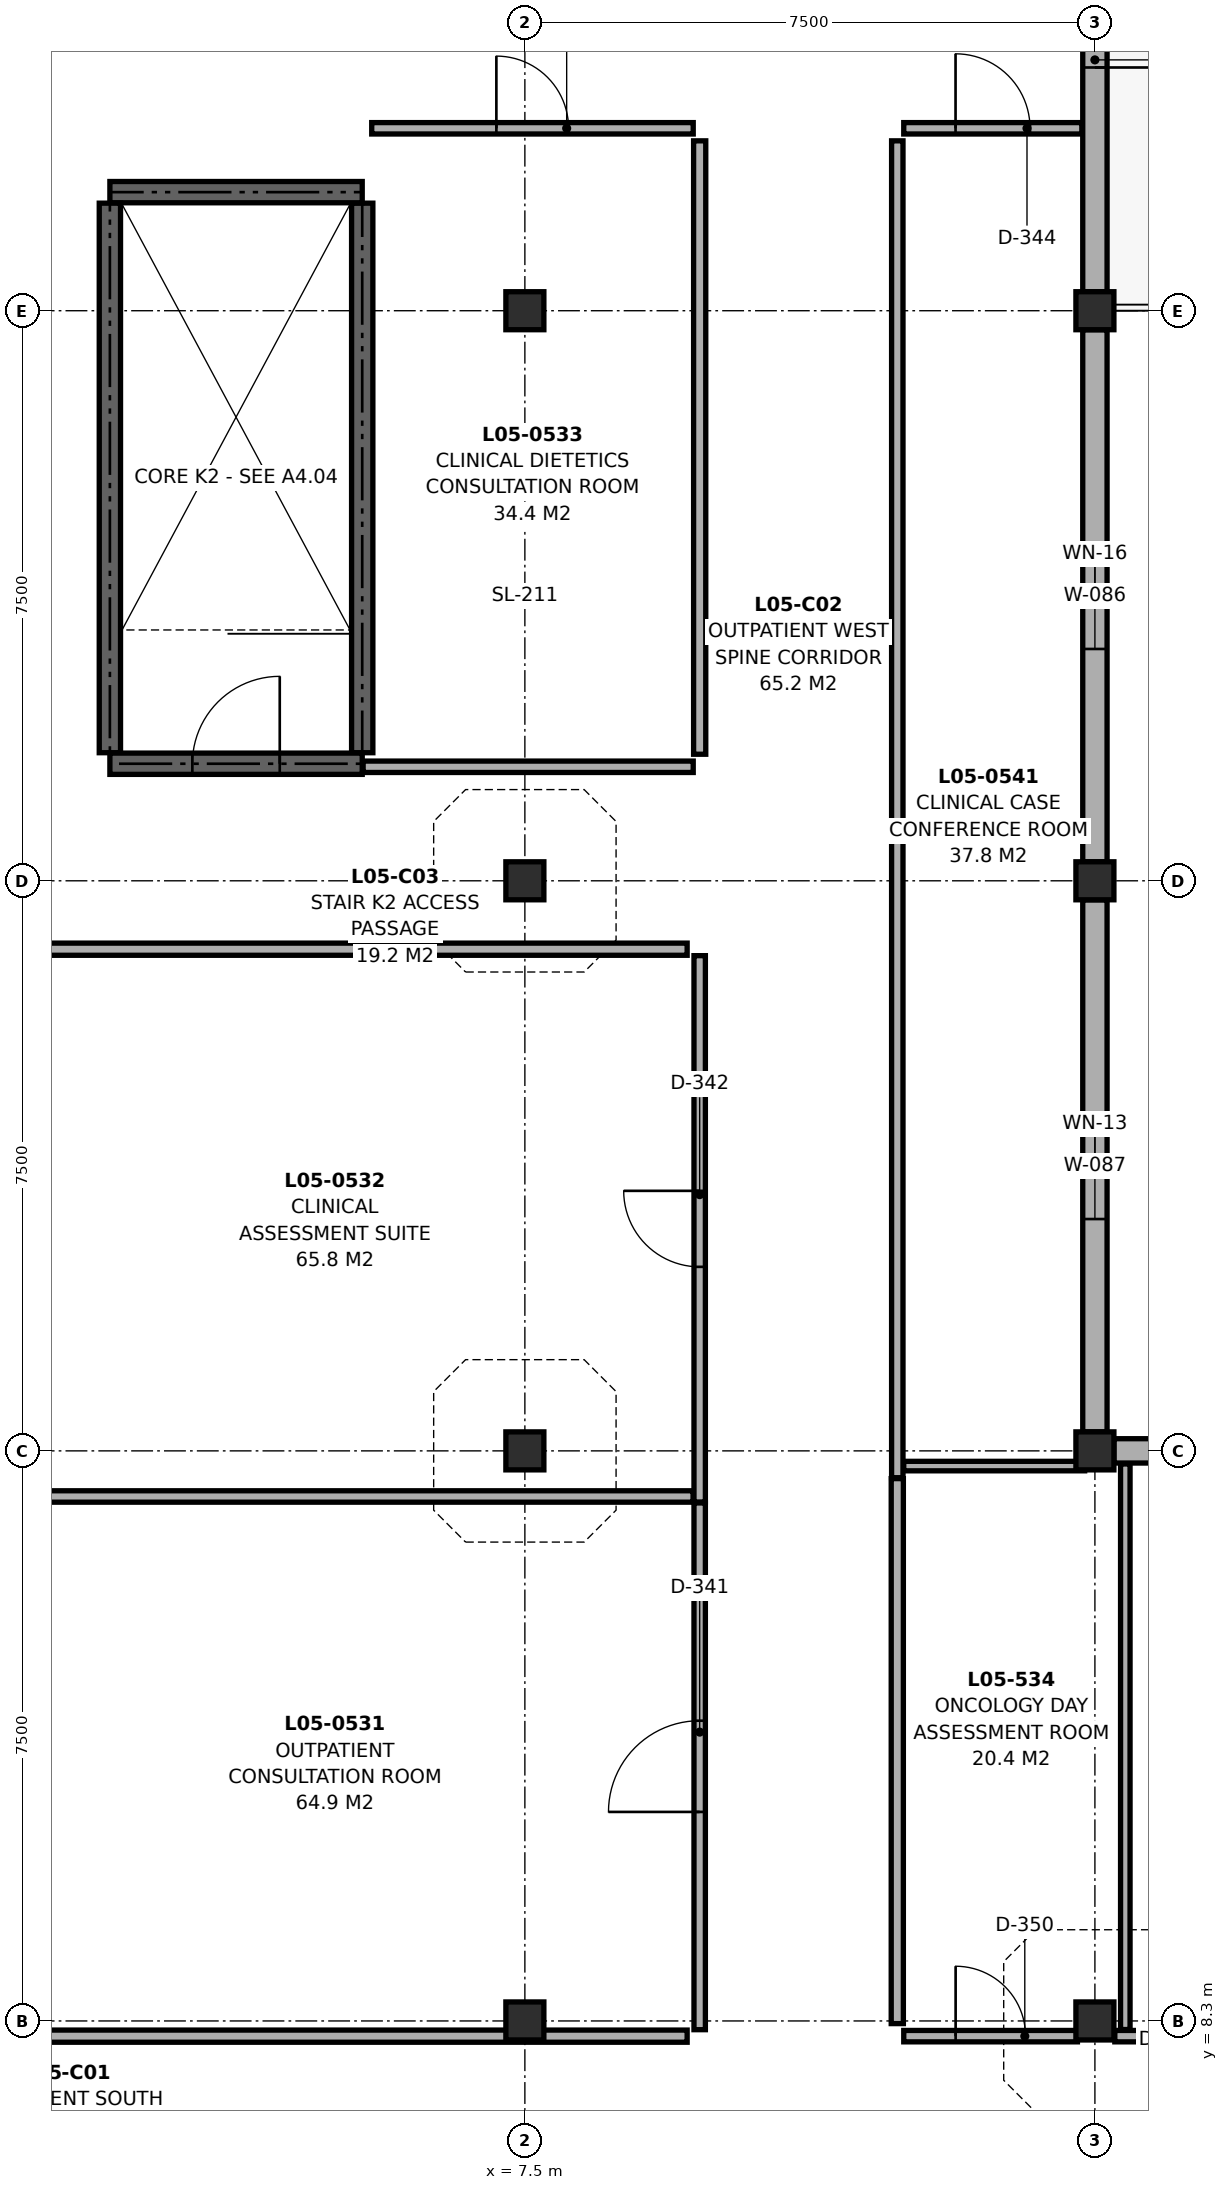
"""IFC4 building model, lengths in metres.
Left out: names, types, materials, properties, quantities, classifications, styles, units other than length and angle.
Written with IfcOpenShell. Run it as: python <this file> out.ifc"""

import sys

from ifc_helpers import new_model, si_unit, direction, frame, frame_2d, origin, origin_2d, place, context, subcontext, project, spatial, rectangle, extrude, element, fill, save


model = new_model("IFC4")
c1 = context("Model", 3, precision=1e-05, world=origin(), true_north=direction((0.0, 1.0)))
c2 = subcontext(c1, "Body", "Model", "MODEL_VIEW")
j1 = project(units=[si_unit("LENGTHUNIT", "METRE"), si_unit("PLANEANGLEUNIT", "RADIAN")], contexts=[c1])
p1 = place(None, origin())
s1 = spatial("IfcSite", under=j1, at=p1, CompositionType="ELEMENT")
p2 = place(p1, origin())
s2 = spatial("IfcBuilding", under=s1, at=p2, CompositionType="ELEMENT")
p3 = place(p2, frame((0.0, 0.0, 21.5)))
s3 = spatial("IfcBuildingStorey", under=s2, at=p3, CompositionType="ELEMENT", Elevation=21.5)
p4 = place(p3, frame((7.5, 8.3, 0.0), z_axis=(0.0, 0.0, 1.0), x_axis=(1.0, 0.0, 0.0)))
e1 = element("IfcColumn", 1, at=p4, inside=s3, PredefinedType="COLUMN", context=c2, shape_type="SweptSolid", body=[
    extrude(rectangle(XDim=0.5, YDim=0.5, at=origin_2d()), origin(), (0.0, 0.0, 1.0), 4.08),
])
for number, where, z_axis, x_axis in (
    (2, (7.5, 15.8, 0.0), (0.0, 0.0, 1.0), (1.0, 0.0, 0.0)),
    (3, (7.5, 23.3, 0.0), (0.0, 0.0, 1.0), (1.0, 0.0, 0.0)),
    (4, (7.5, 30.8, 0.0), (0.0, 0.0, 1.0), (1.0, 0.0, 0.0)),
):
    element("IfcColumn", number, at=place(p3, frame(where, z_axis=z_axis, x_axis=x_axis)), inside=s3, PredefinedType="COLUMN", context=c2, shape_type="SweptSolid", body=[
        extrude(rectangle(XDim=0.5, YDim=0.5, at=origin_2d()), origin(), (0.0, 0.0, 1.0), 3.8),
    ])
p5 = place(p3, frame((15.0, 8.3, 0.0), z_axis=(0.0, 0.0, 1.0), x_axis=(1.0, 0.0, 0.0)))
e5 = element("IfcColumn", 5, at=p5, inside=s3, PredefinedType="COLUMN", context=c2, shape_type="SweptSolid", body=[
    extrude(rectangle(XDim=0.5, YDim=0.5, at=origin_2d()), origin(), (0.0, 0.0, 1.0), 4.33),
])
for number, where, z_axis, x_axis in (
    (6, (15.0, 15.8, 0.0), (0.0, 0.0, 1.0), (1.0, 0.0, 0.0)),
    (7, (15.0, 23.3, 0.0), (0.0, 0.0, 1.0), (1.0, 0.0, 0.0)),
    (8, (15.0, 30.8, 0.0), (0.0, 0.0, 1.0), (1.0, 0.0, 0.0)),
):
    element("IfcColumn", number, at=place(p3, frame(where, z_axis=z_axis, x_axis=x_axis)), inside=s3, PredefinedType="COLUMN", context=c2, shape_type="SweptSolid", body=[
        extrude(rectangle(XDim=0.5, YDim=0.5, at=origin_2d()), origin(), (0.0, 0.0, 1.0), 3.8),
    ])
p6 = place(p3, frame((15.0, 38.05, 0.0), z_axis=(0.0, 0.0, 1.0), x_axis=(0.0, -1.0, 0.0)))
e9 = element("IfcWall", 9, at=p6, inside=s3, PredefinedType="SOLIDWALL", context=c2, shape_type="SweptSolid", body=[
    extrude(rectangle(XDim=7.0, YDim=0.32, at=frame_2d((3.5, 0.0))), origin(), (0.0, 0.0, 1.0), 3.7),
])
p7 = place(p6, frame((2.95, 0.0, 0.0)))
e10 = element("IfcOpeningElement", 10, at=p7, cuts=e9, PredefinedType="OPENING", context=c2, shape_type="SweptSolid", body=[
    extrude(rectangle(XDim=1.1, YDim=2.15, at=frame_2d((0.55, 1.075))), frame((0.0, 0.172, 0.0), z_axis=(0.0, -1.0, 0.0), x_axis=(1.0, 0.0, 0.0)), (0.0, 0.0, 1.0), 0.344),
])
p8 = place(p3, frame((15.0, 30.55, 0.0), z_axis=(0.0, 0.0, 1.0), x_axis=(0.0, -1.0, 0.0)))
e11 = element("IfcWall", 11, at=p8, inside=s3, PredefinedType="SOLIDWALL", context=c2, shape_type="SweptSolid", body=[
    extrude(rectangle(XDim=7.0, YDim=0.32, at=frame_2d((3.5, 0.0))), origin(), (0.0, 0.0, 1.0), 3.7),
])
p9 = place(p8, frame((2.8, 0.0, 0.9)))
e12 = element("IfcOpeningElement", 12, at=p9, cuts=e11, PredefinedType="OPENING", context=c2, shape_type="SweptSolid", body=[
    extrude(rectangle(XDim=1.4, YDim=1.9, at=frame_2d((0.7, 0.95))), frame((0.0, 0.172, 0.0), z_axis=(0.0, -1.0, 0.0), x_axis=(1.0, 0.0, 0.0)), (0.0, 0.0, 1.0), 0.344),
])
p10 = place(p3, frame((15.0, 23.05, 0.0), z_axis=(0.0, 0.0, 1.0), x_axis=(0.0, -1.0, 0.0)))
e13 = element("IfcWall", 13, at=p10, inside=s3, PredefinedType="SOLIDWALL", context=c2, shape_type="SweptSolid", body=[
    extrude(rectangle(XDim=7.0, YDim=0.32, at=frame_2d((3.5, 0.0))), origin(), (0.0, 0.0, 1.0), 3.7),
])
p11 = place(p10, frame((2.8, 0.0, 0.9)))
e14 = element("IfcOpeningElement", 14, at=p11, cuts=e13, PredefinedType="OPENING", context=c2, shape_type="SweptSolid", body=[
    extrude(rectangle(XDim=1.4, YDim=1.3, at=frame_2d((0.7, 0.65))), frame((0.0, 0.172, 0.0), z_axis=(0.0, -1.0, 0.0), x_axis=(1.0, 0.0, 0.0)), (0.0, 0.0, 1.0), 0.344),
])
p12 = place(p3, frame((15.25, 15.8, 0.0), z_axis=(0.0, 0.0, 1.0), x_axis=(1.0, 0.0, 0.0)))
e15 = element("IfcWall", 15, at=p12, inside=s3, PredefinedType="SOLIDWALL", context=c2, shape_type="SweptSolid", body=[
    extrude(rectangle(XDim=7.0, YDim=0.32, at=frame_2d((3.5, 0.0))), origin(), (0.0, 0.0, 1.0), 3.7),
])
p13 = place(p3, frame((5.36, 24.985, 0.0), z_axis=(0.0, 0.0, 1.0), x_axis=(0.0, 1.0, 0.0)))
e16 = element("IfcWall", 16, at=p13, inside=s3, PredefinedType="SHEAR", context=c2, shape_type="SweptSolid", body=[
    extrude(rectangle(XDim=7.23, YDim=0.28, at=frame_2d((3.615, 0.0))), origin(), (0.0, 0.0, 1.0), 3.72),
])
p14 = place(p3, frame((5.36, 32.36, 0.0), z_axis=(0.0, 0.0, 1.0), x_axis=(-1.0, 0.0, 0.0)))
e17 = element("IfcWall", 17, at=p14, inside=s3, PredefinedType="SHEAR", context=c2, shape_type="SweptSolid", body=[
    extrude(rectangle(XDim=3.32, YDim=0.28, at=frame_2d((1.66, 0.0))), origin(), (0.0, 0.0, 1.0), 3.72),
])
p15 = place(p3, frame((2.04, 32.215, 0.0), z_axis=(0.0, 0.0, 1.0), x_axis=(0.0, -1.0, 0.0)))
e18 = element("IfcWall", 18, at=p15, inside=s3, PredefinedType="SHEAR", context=c2, shape_type="SweptSolid", body=[
    extrude(rectangle(XDim=7.23, YDim=0.28, at=frame_2d((3.615, 0.0))), origin(), (0.0, 0.0, 1.0), 3.72),
])
p16 = place(p3, frame((2.04, 24.84, 0.0), z_axis=(0.0, 0.0, 1.0), x_axis=(1.0, 0.0, 0.0)))
e19 = element("IfcWall", 19, at=p16, inside=s3, PredefinedType="SHEAR", context=c2, shape_type="SweptSolid", body=[
    extrude(rectangle(XDim=3.32, YDim=0.28, at=frame_2d((1.66, 0.0))), origin(), (0.0, 0.0, 1.0), 3.72),
])
p17 = place(p16, frame((1.085, 0.0, 0.0)))
e20 = element("IfcOpeningElement", 20, at=p17, cuts=e19, PredefinedType="OPENING", context=c2, shape_type="SweptSolid", body=[
    extrude(rectangle(XDim=1.15, YDim=2.15, at=frame_2d((0.575, 1.075))), frame((0.0, 0.152, 0.0), z_axis=(0.0, -1.0, 0.0), x_axis=(1.0, 0.0, 0.0)), (0.0, 0.0, 1.0), 0.304),
])
p18 = place(p3, frame((15.262, 8.1, 0.0), z_axis=(0.0, 0.0, 1.0), x_axis=(1.0, 0.0, 0.0)))
e21 = element("IfcWall", 21, at=p18, inside=s3, PredefinedType="PARTITIONING", context=c2, shape_type="SweptSolid", body=[
    extrude(rectangle(XDim=7.146, YDim=0.15, at=frame_2d((3.573, 0.0))), origin(), (0.0, 0.0, 1.0), 3.7),
])
p19 = place(p18, frame((2.883, 0.0, 0.0)))
e22 = element("IfcOpeningElement", 22, at=p19, cuts=e21, PredefinedType="OPENING", context=c2, shape_type="SweptSolid", body=[
    extrude(rectangle(XDim=1.38, YDim=2.3, at=frame_2d((0.69, 1.15))), frame((0.0, 0.087, 0.0), z_axis=(0.0, -1.0, 0.0), x_axis=(1.0, 0.0, 0.0)), (0.0, 0.0, 1.0), 0.174),
])
p20 = place(p3, frame((9.8, 8.185, 0.0), z_axis=(0.0, 0.0, 1.0), x_axis=(0.0, 1.0, 0.0)))
e23 = element("IfcWall", 23, at=p20, inside=s3, PredefinedType="PARTITIONING", context=c2, shape_type="SweptSolid", body=[
    extrude(rectangle(XDim=6.93, YDim=0.15, at=frame_2d((3.465, 0.0))), origin(), (0.0, 0.0, 1.0), 3.7),
])
p21 = place(p20, frame((2.865, 0.0, 0.0)))
e24 = element("IfcOpeningElement", 24, at=p21, cuts=e23, PredefinedType="OPENING", context=c2, shape_type="SweptSolid", body=[
    extrude(rectangle(XDim=1.2, YDim=2.15, at=frame_2d((0.6, 1.075))), frame((0.0, 0.087, 0.0), z_axis=(0.0, -1.0, 0.0), x_axis=(1.0, 0.0, 0.0)), (0.0, 0.0, 1.0), 0.174),
])
p22 = place(p3, frame((9.8, 15.127, 0.0), z_axis=(0.0, 0.0, 1.0), x_axis=(0.0, 1.0, 0.0)))
e25 = element("IfcWall", 25, at=p22, inside=s3, PredefinedType="PARTITIONING", context=c2, shape_type="SweptSolid", body=[
    extrude(rectangle(XDim=7.188, YDim=0.15, at=frame_2d((3.594, 0.0))), origin(), (0.0, 0.0, 1.0), 3.7),
])
p23 = place(p22, frame((3.094, 0.0, 0.0)))
e26 = element("IfcOpeningElement", 26, at=p23, cuts=e25, PredefinedType="OPENING", context=c2, shape_type="SweptSolid", body=[
    extrude(rectangle(XDim=1.0, YDim=2.22, at=frame_2d((0.5, 1.11))), frame((0.0, 0.087, 0.0), z_axis=(0.0, -1.0, 0.0), x_axis=(1.0, 0.0, 0.0)), (0.0, 0.0, 1.0), 0.174),
])
p24 = place(p3, frame((5.485, 33.2, 0.0), z_axis=(0.0, 0.0, 1.0), x_axis=(1.0, 0.0, 0.0)))
e27 = element("IfcWall", 27, at=p24, inside=s3, PredefinedType="PARTITIONING", context=c2, shape_type="SweptSolid", body=[
    extrude(rectangle(XDim=4.23, YDim=0.15, at=frame_2d((2.115, 0.0))), origin(), (0.0, 0.0, 1.0), 3.7),
])
p25 = place(p24, frame((1.64, 0.0, 0.0)))
e28 = element("IfcOpeningElement", 28, at=p25, cuts=e27, PredefinedType="OPENING", context=c2, shape_type="SweptSolid", body=[
    extrude(rectangle(XDim=0.95, YDim=2.15, at=frame_2d((0.475, 1.075))), frame((0.0, 0.087, 0.0), z_axis=(0.0, -1.0, 0.0), x_axis=(1.0, 0.0, 0.0)), (0.0, 0.0, 1.0), 0.174),
])
p26 = place(p3, frame((12.485, 8.1, 0.0), z_axis=(0.0, 0.0, 1.0), x_axis=(1.0, 0.0, 0.0)))
e29 = element("IfcWall", 29, at=p26, inside=s3, PredefinedType="PARTITIONING", context=c2, shape_type="SweptSolid", body=[
    extrude(rectangle(XDim=2.285, YDim=0.15, at=frame_2d((1.143, 0.0))), origin(), (0.0, 0.0, 1.0), 3.7),
])
p27 = place(p26, frame((0.683, 0.0, 0.0)))
e30 = element("IfcOpeningElement", 30, at=p27, cuts=e29, PredefinedType="OPENING", context=c2, shape_type="SweptSolid", body=[
    extrude(rectangle(XDim=0.92, YDim=2.1, at=frame_2d((0.46, 1.05))), frame((0.0, 0.087, 0.0), z_axis=(0.0, -1.0, 0.0), x_axis=(1.0, 0.0, 0.0)), (0.0, 0.0, 1.0), 0.174),
])
p28 = place(p3, frame((12.485, 33.2, 0.0), z_axis=(0.0, 0.0, 1.0), x_axis=(1.0, 0.0, 0.0)))
e31 = element("IfcWall", 31, at=p28, inside=s3, PredefinedType="PARTITIONING", context=c2, shape_type="SweptSolid", body=[
    extrude(rectangle(XDim=2.343, YDim=0.15, at=frame_2d((1.171, 0.0))), origin(), (0.0, 0.0, 1.0), 3.7),
])
p29 = place(p28, frame((0.681, 0.0, 0.0)))
e32 = element("IfcOpeningElement", 32, at=p29, cuts=e31, PredefinedType="OPENING", context=c2, shape_type="SweptSolid", body=[
    extrude(rectangle(XDim=0.98, YDim=2.12, at=frame_2d((0.49, 1.06))), frame((0.0, 0.087, 0.0), z_axis=(0.0, -1.0, 0.0), x_axis=(1.0, 0.0, 0.0)), (0.0, 0.0, 1.0), 0.174),
])
p30 = place(p3, frame((5.372, 24.8, 0.0), z_axis=(0.0, 0.0, 1.0), x_axis=(1.0, 0.0, 0.0)))
e33 = element("IfcWall", 33, at=p30, inside=s3, PredefinedType="PARTITIONING", context=c2, shape_type="SweptSolid", body=[
    extrude(rectangle(XDim=4.343, YDim=0.15, at=frame_2d((2.171, 0.0))), origin(), (0.0, 0.0, 1.0), 3.7),
])
p31 = place(p3, frame((12.485, 15.6, 0.0), z_axis=(0.0, 0.0, 1.0), x_axis=(1.0, 0.0, 0.0)))
e34 = element("IfcWall", 34, at=p31, inside=s3, PredefinedType="PARTITIONING", context=c2, shape_type="SweptSolid", body=[
    extrude(rectangle(XDim=2.38, YDim=0.125, at=frame_2d((1.19, 0.0))), origin(), (0.0, 0.0, 1.0), 3.7),
])
p32 = place(p3, frame((15.4, 8.187, 0.0), z_axis=(0.0, 0.0, 1.0), x_axis=(0.0, 1.0, 0.0)))
e35 = element("IfcWall", 35, at=p32, inside=s3, PredefinedType="PARTITIONING", context=c2, shape_type="SweptSolid", body=[
    extrude(rectangle(XDim=7.441, YDim=0.125, at=frame_2d((3.72, 0.0))), origin(), (0.0, 0.0, 1.0), 3.7),
])
p33 = place(p3, frame((0.262, 8.1, 0.0), z_axis=(0.0, 0.0, 1.0), x_axis=(1.0, 0.0, 0.0)))
e36 = element("IfcWall", 36, at=p33, inside=s3, PredefinedType="PARTITIONING", context=c2, shape_type="SweptSolid", body=[
    extrude(rectangle(XDim=9.373, YDim=0.16, at=frame_2d((4.687, 0.0))), origin(), (0.0, 0.0, 1.0), 3.7),
])
p34 = place(p3, frame((0.172, 15.2, 0.0), z_axis=(0.0, 0.0, 1.0), x_axis=(1.0, 0.0, 0.0)))
e37 = element("IfcWall", 37, at=p34, inside=s3, PredefinedType="PARTITIONING", context=c2, shape_type="SweptSolid", body=[
    extrude(rectangle(XDim=9.541, YDim=0.15, at=frame_2d((4.771, 0.0))), origin(), (0.0, 0.0, 1.0), 3.7),
])
p35 = place(p3, frame((0.172, 22.4, 0.0), z_axis=(0.0, 0.0, 1.0), x_axis=(1.0, 0.0, 0.0)))
e38 = element("IfcWall", 38, at=p35, inside=s3, PredefinedType="PARTITIONING", context=c2, shape_type="SweptSolid", body=[
    extrude(rectangle(XDim=9.463, YDim=0.16, at=frame_2d((4.731, 0.0))), origin(), (0.0, 0.0, 1.0), 3.7),
])
p36 = place(p3, frame((9.8, 24.965, 0.0), z_axis=(0.0, 0.0, 1.0), x_axis=(0.0, 1.0, 0.0)))
e39 = element("IfcWall", 39, at=p36, inside=s3, PredefinedType="PARTITIONING", context=c2, shape_type="SweptSolid", body=[
    extrude(rectangle(XDim=8.07, YDim=0.16, at=frame_2d((4.035, 0.0))), origin(), (0.0, 0.0, 1.0), 3.7),
])
p37 = place(p3, frame((12.4, 8.265, 0.0), z_axis=(0.0, 0.0, 1.0), x_axis=(0.0, 1.0, 0.0)))
e40 = element("IfcWall", 40, at=p37, inside=s3, PredefinedType="PARTITIONING", context=c2, shape_type="SweptSolid", body=[
    extrude(rectangle(XDim=7.17, YDim=0.16, at=frame_2d((3.585, 0.0))), origin(), (0.0, 0.0, 1.0), 3.7),
])
p38 = place(p3, frame((12.4, 15.447, 0.0), z_axis=(0.0, 0.0, 1.0), x_axis=(0.0, 1.0, 0.0)))
e41 = element("IfcWall", 41, at=p38, inside=s3, PredefinedType="PARTITIONING", context=c2, shape_type="SweptSolid", body=[
    extrude(rectangle(XDim=17.588, YDim=0.15, at=frame_2d((8.794, 0.0))), origin(), (0.0, 0.0, 1.0), 3.7),
])
p39 = place(p7, origin())
e42 = element("IfcDoor", 42, at=p39, inside=s3, OperationType="SINGLE_SWING_RIGHT", PredefinedType="DOOR", context=c2, shape_type="SweptSolid", body=[
    extrude(rectangle(XDim=1.1, YDim=2.15, at=frame_2d((0.55, 1.075))), frame((0.0, 0.025, 0.0), z_axis=(0.0, -1.0, 0.0), x_axis=(1.0, 0.0, 0.0)), (0.0, 0.0, 1.0), 0.05),
])
fill(e10, e42)
p40 = place(p9, origin())
e43 = element("IfcWindow", 43, at=p40, inside=s3, PartitioningType="SINGLE_PANEL", PredefinedType="WINDOW", context=c2, shape_type="SweptSolid", body=[
    extrude(rectangle(XDim=1.4, YDim=1.9, at=frame_2d((0.7, 0.95))), frame((0.0, 0.03, 0.0), z_axis=(0.0, -1.0, 0.0), x_axis=(1.0, 0.0, 0.0)), (0.0, 0.0, 1.0), 0.06),
])
fill(e12, e43)
p41 = place(p11, origin())
e44 = element("IfcWindow", 44, at=p41, inside=s3, PartitioningType="SINGLE_PANEL", PredefinedType="WINDOW", context=c2, shape_type="SweptSolid", body=[
    extrude(rectangle(XDim=1.4, YDim=1.3, at=frame_2d((0.7, 0.65))), frame((0.0, 0.03, 0.0), z_axis=(0.0, -1.0, 0.0), x_axis=(1.0, 0.0, 0.0)), (0.0, 0.0, 1.0), 0.06),
])
fill(e14, e44)
p42 = place(p17, origin())
e45 = element("IfcDoor", 45, at=p42, inside=s3, OperationType="SINGLE_SWING_RIGHT", PredefinedType="DOOR", context=c2, shape_type="SweptSolid", body=[
    extrude(rectangle(XDim=1.15, YDim=2.15, at=frame_2d((0.575, 1.075))), frame((0.0, 0.025, 0.0), z_axis=(0.0, -1.0, 0.0), x_axis=(1.0, 0.0, 0.0)), (0.0, 0.0, 1.0), 0.05),
])
fill(e20, e45)
p43 = place(p21, origin())
e46 = element("IfcDoor", 46, at=p43, inside=s3, OperationType="SINGLE_SWING_LEFT", PredefinedType="DOOR", context=c2, shape_type="SweptSolid", body=[
    extrude(rectangle(XDim=1.2, YDim=2.15, at=frame_2d((0.6, 1.075))), frame((0.0, 0.025, 0.0), z_axis=(0.0, -1.0, 0.0), x_axis=(1.0, 0.0, 0.0)), (0.0, 0.0, 1.0), 0.05),
])
fill(e24, e46)
p44 = place(p23, origin())
e47 = element("IfcDoor", 47, at=p44, inside=s3, OperationType="SINGLE_SWING_RIGHT", PredefinedType="DOOR", context=c2, shape_type="SweptSolid", body=[
    extrude(rectangle(XDim=1.0, YDim=2.22, at=frame_2d((0.5, 1.11))), frame((0.0, 0.025, 0.0), z_axis=(0.0, -1.0, 0.0), x_axis=(1.0, 0.0, 0.0)), (0.0, 0.0, 1.0), 0.05),
])
fill(e26, e47)
p45 = place(p25, origin())
e48 = element("IfcDoor", 48, at=p45, inside=s3, OperationType="SINGLE_SWING_LEFT", PredefinedType="DOOR", context=c2, shape_type="SweptSolid", body=[
    extrude(rectangle(XDim=0.95, YDim=2.15, at=frame_2d((0.475, 1.075))), frame((0.0, 0.025, 0.0), z_axis=(0.0, -1.0, 0.0), x_axis=(1.0, 0.0, 0.0)), (0.0, 0.0, 1.0), 0.05),
])
fill(e28, e48)
p46 = place(p27, origin())
e49 = element("IfcDoor", 49, at=p46, inside=s3, OperationType="SINGLE_SWING_LEFT", PredefinedType="DOOR", context=c2, shape_type="SweptSolid", body=[
    extrude(rectangle(XDim=0.92, YDim=2.1, at=frame_2d((0.46, 1.05))), frame((0.0, 0.025, 0.0), z_axis=(0.0, -1.0, 0.0), x_axis=(1.0, 0.0, 0.0)), (0.0, 0.0, 1.0), 0.05),
])
fill(e30, e49)
p47 = place(p29, origin())
e50 = element("IfcDoor", 50, at=p47, inside=s3, OperationType="SINGLE_SWING_LEFT", PredefinedType="DOOR", context=c2, shape_type="SweptSolid", body=[
    extrude(rectangle(XDim=0.98, YDim=2.12, at=frame_2d((0.49, 1.06))), frame((0.0, 0.025, 0.0), z_axis=(0.0, -1.0, 0.0), x_axis=(1.0, 0.0, 0.0)), (0.0, 0.0, 1.0), 0.05),
])
fill(e32, e50)
save(model, sys.argv[1])
